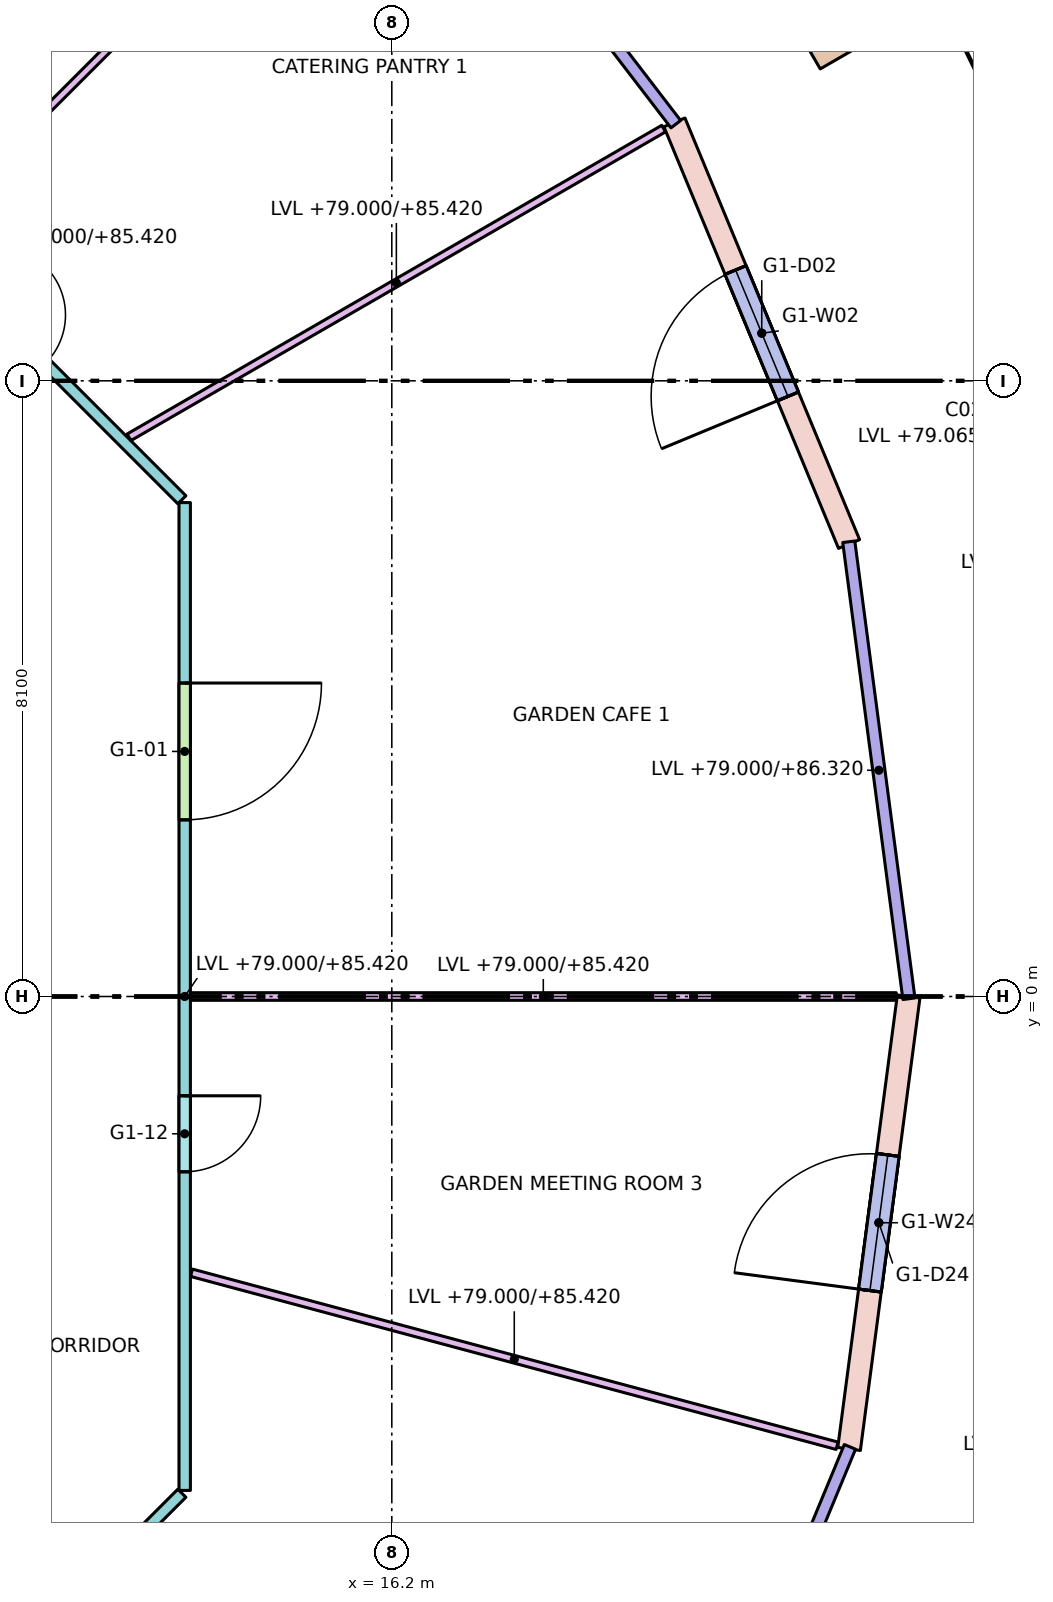
"""IFC4 building model, lengths in metres.
Left out: names, types, materials, properties, quantities, classifications, styles, units other than length and angle.
Written with IfcOpenShell. Run it as: python <this file> out.ifc"""

import sys

from ifc_helpers import new_model, si_unit, direction, frame, frame_2d, origin, origin_2d, place, context, subcontext, project, spatial, rectangle, extrude, element, fill, save


model = new_model("IFC4")
c1 = context("Model", 3, precision=1e-05, world=origin(), true_north=direction((0.0, 1.0)))
c2 = subcontext(c1, "Body", "Model", "MODEL_VIEW")
j1 = project(units=[si_unit("LENGTHUNIT", "METRE"), si_unit("PLANEANGLEUNIT", "RADIAN")], contexts=[c1])
p1 = place(None, origin())
s1 = spatial("IfcSite", under=j1, at=p1, CompositionType="ELEMENT")
p2 = place(p1, origin())
s2 = spatial("IfcBuilding", under=s1, at=p2, CompositionType="ELEMENT")
p3 = place(p2, frame((0.0, 0.0, 79.0)))
s3 = spatial("IfcBuildingStorey", under=s2, at=p3, CompositionType="ELEMENT", Elevation=79.0)
p4 = place(p3, frame((22.942, 13.246, 0.065), z_axis=(-0.112966818214, -0.065200584695, 0.991457201163), x_axis=(0.499880173341, -0.866094574686, 0.0)))
e1 = element("IfcColumn", 1, at=p4, inside=s3, PredefinedType="COLUMN", context=c2, shape_type="SweptSolid", body=[
    extrude(rectangle(XDim=0.7, YDim=1.0, at=origin_2d()), origin(), (0.0, 0.0, 1.0), 7.534),
])
p5 = place(p3, frame((22.216, 5.953, 0.0), z_axis=(0.0, 0.0, 1.0), x_axis=(-0.382671411433, 0.923884511653, 0.0)))
e2 = element("IfcWall", 2, at=p5, inside=s3, PredefinedType="STANDARD", context=c2, shape_type="SweptSolid", body=[
    extrude(rectangle(XDim=6.004, YDim=0.3, at=frame_2d((3.002, 0.0))), origin(), (0.0, 0.0, 1.0), 7.32),
])
p6 = place(p5, frame((2.102, 0.0, 0.0)))
e3 = element("IfcOpeningElement", 3, at=p6, cuts=e2, PredefinedType="OPENING", context=c2, shape_type="SweptSolid", body=[
    extrude(rectangle(XDim=1.8, YDim=2.4, at=frame_2d((0.9, 1.2))), frame((0.0, 0.16, 0.0), z_axis=(0.0, -1.0, 0.0), x_axis=(1.0, 0.0, 0.0)), (0.0, 0.0, 1.0), 0.32),
])
p7 = place(p5, frame((2.102, 0.0, 2.8)))
e4 = element("IfcOpeningElement", 4, at=p7, cuts=e2, PredefinedType="OPENING", context=c2, shape_type="SweptSolid", body=[
    extrude(rectangle(XDim=1.8, YDim=4.3, at=frame_2d((0.9, 2.15))), frame((0.0, 0.16, 0.0), z_axis=(0.0, -1.0, 0.0), x_axis=(1.0, 0.0, 0.0)), (0.0, 0.0, 1.0), 0.32),
])
p8 = place(p3, frame((22.216, -5.953, 0.0), z_axis=(0.0, 0.0, 1.0), x_axis=(0.130522880875, 0.991445297315, 0.0)))
e5 = element("IfcWall", 5, at=p8, inside=s3, PredefinedType="STANDARD", context=c2, shape_type="SweptSolid", body=[
    extrude(rectangle(XDim=6.004, YDim=0.3, at=frame_2d((3.002, 0.0))), origin(), (0.0, 0.0, 1.0), 7.32),
])
p9 = place(p8, frame((2.102, 0.0, 0.0)))
e6 = element("IfcOpeningElement", 6, at=p9, cuts=e5, PredefinedType="OPENING", context=c2, shape_type="SweptSolid", body=[
    extrude(rectangle(XDim=1.8, YDim=2.4, at=frame_2d((0.9, 1.2))), frame((0.0, 0.16, 0.0), z_axis=(0.0, -1.0, 0.0), x_axis=(1.0, 0.0, 0.0)), (0.0, 0.0, 1.0), 0.32),
])
p10 = place(p8, frame((2.102, 0.0, 2.8)))
e7 = element("IfcOpeningElement", 7, at=p10, cuts=e5, PredefinedType="OPENING", context=c2, shape_type="SweptSolid", body=[
    extrude(rectangle(XDim=1.8, YDim=4.3, at=frame_2d((0.9, 2.15))), frame((0.0, 0.16, 0.0), z_axis=(0.0, -1.0, 0.0), x_axis=(1.0, 0.0, 0.0)), (0.0, 0.0, 1.0), 0.32),
])
p11 = place(p3, frame((13.438, -6.535, 0.0), z_axis=(0.0, 0.0, 1.0), x_axis=(-0.707106781187, -0.707106781187, 0.0)))
e8 = element("IfcWall", 8, at=p11, inside=s3, PredefinedType="PARTITIONING", context=c2, shape_type="SweptSolid", body=[
    extrude(rectangle(XDim=6.934, YDim=0.15, at=frame_2d((3.467, 0.0))), origin(), (0.0, 0.0, 1.0), 6.42),
])
p12 = place(p11, frame((2.567, 0.0, 0.0)))
e9 = element("IfcOpeningElement", 9, at=p12, cuts=e8, PredefinedType="OPENING", context=c2, shape_type="SweptSolid", body=[
    extrude(rectangle(XDim=1.8, YDim=2.1, at=frame_2d((0.9, 1.05))), frame((0.0, 0.085, 0.0), z_axis=(0.0, -1.0, 0.0), x_axis=(1.0, 0.0, 0.0)), (0.0, 0.0, 1.0), 0.17),
])
p13 = place(p3, frame((8.535, 11.438, 0.0), z_axis=(0.0, 0.0, 1.0), x_axis=(0.707106781187, -0.707106781187, 0.0)))
e10 = element("IfcWall", 10, at=p13, inside=s3, PredefinedType="PARTITIONING", context=c2, shape_type="SweptSolid", body=[
    extrude(rectangle(XDim=6.934, YDim=0.15, at=frame_2d((3.467, 0.0))), origin(), (0.0, 0.0, 1.0), 6.42),
])
p14 = place(p13, frame((3.496, 0.0, 0.0)))
e11 = element("IfcOpeningElement", 11, at=p14, cuts=e10, PredefinedType="OPENING", context=c2, shape_type="SweptSolid", body=[
    extrude(rectangle(XDim=0.9, YDim=2.1, at=frame_2d((0.45, 1.05))), frame((0.0, 0.085, 0.0), z_axis=(0.0, -1.0, 0.0), x_axis=(1.0, 0.0, 0.0)), (0.0, 0.0, 1.0), 0.17),
])
p15 = place(p3, frame((13.475, 6.498, 0.0), z_axis=(0.0, 0.0, 1.0), x_axis=(0.0, -1.0, 0.0)))
e12 = element("IfcWall", 12, at=p15, inside=s3, PredefinedType="PARTITIONING", context=c2, shape_type="SweptSolid", body=[
    extrude(rectangle(XDim=12.996, YDim=0.15, at=frame_2d((6.498, 0.0))), origin(), (0.0, 0.0, 1.0), 6.42),
])
p16 = place(p15, frame((2.374, 0.0, 0.0)))
e13 = element("IfcOpeningElement", 13, at=p16, cuts=e12, PredefinedType="OPENING", context=c2, shape_type="SweptSolid", body=[
    extrude(rectangle(XDim=1.8, YDim=2.1, at=frame_2d((0.9, 1.05))), frame((0.0, 0.085, 0.0), z_axis=(0.0, -1.0, 0.0), x_axis=(1.0, 0.0, 0.0)), (0.0, 0.0, 1.0), 0.17),
])
p17 = place(p15, frame((7.804, 0.0, 0.0)))
e14 = element("IfcOpeningElement", 14, at=p17, cuts=e12, PredefinedType="OPENING", context=c2, shape_type="SweptSolid", body=[
    extrude(rectangle(XDim=1.0, YDim=2.1, at=frame_2d((0.5, 1.05))), frame((0.0, 0.085, 0.0), z_axis=(0.0, -1.0, 0.0), x_axis=(1.0, 0.0, 0.0)), (0.0, 0.0, 1.0), 0.17),
])
p18 = place(p3, frame((13.55, 0.0, 0.0), z_axis=(0.0, 0.0, 1.0), x_axis=(1.0, 0.0, 0.0)))
e15 = element("IfcWall", 15, at=p18, inside=s3, PredefinedType="PARTITIONING", context=c2, shape_type="SweptSolid", body=[
    extrude(rectangle(XDim=9.287, YDim=0.1, at=frame_2d((4.643, 0.0))), origin(), (0.0, 0.0, 1.0), 6.42),
])
p19 = place(p3, frame((12.742, 7.357, 0.0), z_axis=(0.0, 0.0, 1.0), x_axis=(0.866022418986, 0.500005169787, 0.0)))
e16 = element("IfcWall", 16, at=p19, inside=s3, PredefinedType="PARTITIONING", context=c2, shape_type="SweptSolid", body=[
    extrude(rectangle(XDim=8.123, YDim=0.1, at=frame_2d((4.062, 0.0))), origin(), (0.0, 0.0, 1.0), 6.42),
])
p20 = place(p3, frame((10.04, 10.04, 0.0), z_axis=(0.0, 0.0, 1.0), x_axis=(0.707106781187, 0.707106781187, 0.0)))
e17 = element("IfcWall", 17, at=p20, inside=s3, PredefinedType="PARTITIONING", context=c2, shape_type="SweptSolid", body=[
    extrude(rectangle(XDim=8.639, YDim=0.1, at=frame_2d((4.319, 0.0))), origin(), (0.0, 0.0, 1.0), 6.42),
])
p21 = place(p3, frame((13.564, -3.635, 0.0), z_axis=(0.0, 0.0, 1.0), x_axis=(0.965924134536, -0.25882535873, 0.0)))
e18 = element("IfcWall", 18, at=p21, inside=s3, PredefinedType="PARTITIONING", context=c2, shape_type="SweptSolid", body=[
    extrude(rectangle(XDim=8.794, YDim=0.1, at=frame_2d((4.397, 0.0))), origin(), (0.0, 0.0, 1.0), 6.42),
])
p22 = place(p6, origin())
e19 = element("IfcDoor", 19, at=p22, inside=s3, OperationType="SINGLE_SWING_LEFT", PredefinedType="DOOR", context=c2, shape_type="SweptSolid", body=[
    extrude(rectangle(XDim=1.8, YDim=2.4, at=frame_2d((0.9, 1.2))), frame((0.0, 0.025, 0.0), z_axis=(0.0, -1.0, 0.0), x_axis=(1.0, 0.0, 0.0)), (0.0, 0.0, 1.0), 0.05),
])
fill(e3, e19)
p23 = place(p7, origin())
e20 = element("IfcWindow", 20, at=p23, inside=s3, PartitioningType="SINGLE_PANEL", PredefinedType="WINDOW", context=c2, shape_type="SweptSolid", body=[
    extrude(rectangle(XDim=1.8, YDim=4.3, at=frame_2d((0.9, 2.15))), frame((0.0, 0.03, 0.0), z_axis=(0.0, -1.0, 0.0), x_axis=(1.0, 0.0, 0.0)), (0.0, 0.0, 1.0), 0.06),
])
fill(e4, e20)
p24 = place(p9, origin())
e21 = element("IfcDoor", 21, at=p24, inside=s3, OperationType="SINGLE_SWING_LEFT", PredefinedType="DOOR", context=c2, shape_type="SweptSolid", body=[
    extrude(rectangle(XDim=1.8, YDim=2.4, at=frame_2d((0.9, 1.2))), frame((0.0, 0.025, 0.0), z_axis=(0.0, -1.0, 0.0), x_axis=(1.0, 0.0, 0.0)), (0.0, 0.0, 1.0), 0.05),
])
fill(e6, e21)
p25 = place(p10, origin())
e22 = element("IfcWindow", 22, at=p25, inside=s3, PartitioningType="SINGLE_PANEL", PredefinedType="WINDOW", context=c2, shape_type="SweptSolid", body=[
    extrude(rectangle(XDim=1.8, YDim=4.3, at=frame_2d((0.9, 2.15))), frame((0.0, 0.03, 0.0), z_axis=(0.0, -1.0, 0.0), x_axis=(1.0, 0.0, 0.0)), (0.0, 0.0, 1.0), 0.06),
])
fill(e7, e22)
p26 = place(p16, origin())
e23 = element("IfcDoor", 23, at=p26, inside=s3, OperationType="DOUBLE_DOOR_SINGLE_SWING", PredefinedType="DOOR", context=c2, shape_type="SweptSolid", body=[
    extrude(rectangle(XDim=1.8, YDim=2.1, at=frame_2d((0.9, 1.05))), frame((0.0, 0.025, 0.0), z_axis=(0.0, -1.0, 0.0), x_axis=(1.0, 0.0, 0.0)), (0.0, 0.0, 1.0), 0.05),
])
fill(e13, e23)
p27 = place(p17, origin())
e24 = element("IfcDoor", 24, at=p27, inside=s3, OperationType="SINGLE_SWING_LEFT", PredefinedType="DOOR", context=c2, shape_type="SweptSolid", body=[
    extrude(rectangle(XDim=1.0, YDim=2.1, at=frame_2d((0.5, 1.05))), frame((0.0, 0.025, 0.0), z_axis=(0.0, -1.0, 0.0), x_axis=(1.0, 0.0, 0.0)), (0.0, 0.0, 1.0), 0.05),
])
fill(e14, e24)
save(model, sys.argv[1])
